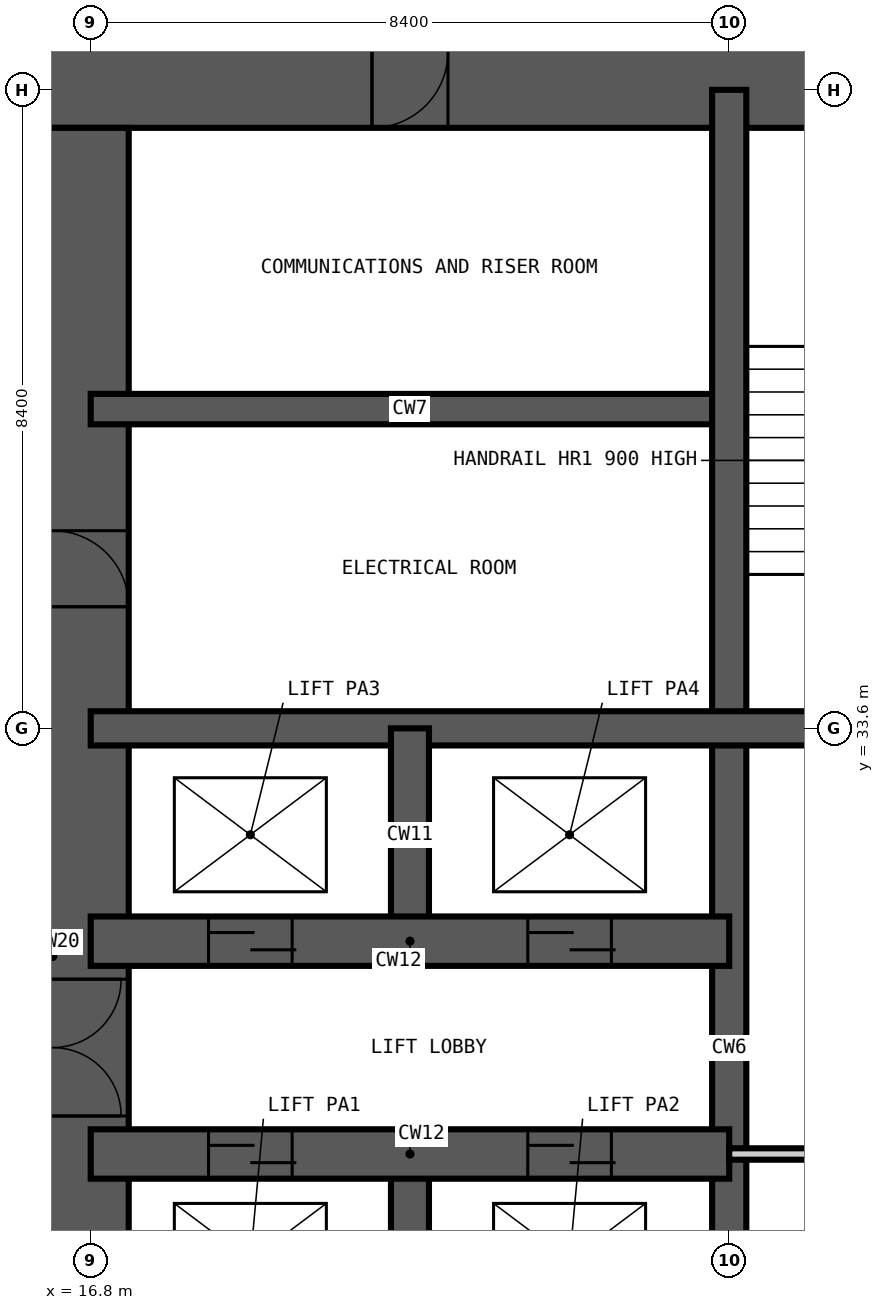
"""IFC4 building model, lengths in metres.
Left out: names, types, materials, properties, quantities, classifications, styles, units other than length and angle.
Written with IfcOpenShell. Run it as: python <this file> out.ifc"""

import sys

from ifc_helpers import new_model, si_unit, direction, frame, frame_2d, origin, place, context, subcontext, project, spatial, rectangle, extrude, element, fill, save


model = new_model("IFC4")
c1 = context("Model", 3, precision=1e-05, world=origin(), true_north=direction((0.0, 1.0)))
c2 = subcontext(c1, "Body", "Model", "MODEL_VIEW")
j1 = project(units=[si_unit("LENGTHUNIT", "METRE"), si_unit("PLANEANGLEUNIT", "RADIAN")], contexts=[c1])
p1 = place(None, origin())
s1 = spatial("IfcSite", under=j1, at=p1, CompositionType="ELEMENT")
p2 = place(p1, origin())
s2 = spatial("IfcBuilding", under=s1, at=p2, CompositionType="ELEMENT")
p3 = place(p2, frame((0.0, 0.0, 27.0)))
s3 = spatial("IfcBuildingStorey", under=s2, at=p3, CompositionType="ELEMENT", Elevation=27.0)
p4 = place(p3, frame((43.5, 42.5, -0.35), z_axis=(0.0, 0.0, 1.0), x_axis=(-1.0, 0.0, 0.0)))
e1 = element("IfcWall", 1, at=p4, inside=s3, PredefinedType="SHEAR", context=c2, shape_type="SweptSolid", body=[
    extrude(rectangle(XDim=28.2, YDim=2.0, at=frame_2d((14.1, 0.0))), origin(), (0.0, 0.0, 1.0), 3.6),
])
p5 = place(p4, frame((22.0, 0.0, 0.35)))
e2 = element("IfcOpeningElement", 2, at=p5, cuts=e1, PredefinedType="OPENING", context=c2, shape_type="SweptSolid", body=[
    extrude(rectangle(XDim=1.0, YDim=2.1, at=frame_2d((0.5, 1.05))), frame((0.0, 1.01, 0.0), z_axis=(0.0, -1.0, 0.0), x_axis=(1.0, 0.0, 0.0)), (0.0, 0.0, 1.0), 2.02),
])
p6 = place(p4, frame((11.4, 0.0, 0.35)))
e3 = element("IfcOpeningElement", 3, at=p6, cuts=e1, PredefinedType="OPENING", context=c2, shape_type="SweptSolid", body=[
    extrude(rectangle(XDim=1.2, YDim=2.2, at=frame_2d((0.6, 1.1))), frame((0.0, 1.01, 0.0), z_axis=(0.0, -1.0, 0.0), x_axis=(1.0, 0.0, 0.0)), (0.0, 0.0, 1.0), 2.02),
])
p7 = place(p3, frame((16.3, 41.5, -0.35), z_axis=(0.0, 0.0, 1.0), x_axis=(0.0, -1.0, 0.0)))
e4 = element("IfcWall", 4, at=p7, inside=s3, PredefinedType="SHEAR", context=c2, shape_type="SweptSolid", body=[
    extrude(rectangle(XDim=24.2, YDim=2.0, at=frame_2d((12.1, 0.0))), origin(), (0.0, 0.0, 1.0), 3.6),
])
p8 = place(p7, frame((11.2, 0.0, 0.35)))
e5 = element("IfcOpeningElement", 5, at=p8, cuts=e4, PredefinedType="OPENING", context=c2, shape_type="SweptSolid", body=[
    extrude(rectangle(XDim=1.8, YDim=2.2, at=frame_2d((0.9, 1.1))), frame((0.0, 1.01, 0.0), z_axis=(0.0, -1.0, 0.0), x_axis=(1.0, 0.0, 0.0)), (0.0, 0.0, 1.0), 2.02),
])
p9 = place(p7, frame((20.0, 0.0, 0.35)))
e6 = element("IfcOpeningElement", 6, at=p9, cuts=e4, PredefinedType="OPENING", context=c2, shape_type="SweptSolid", body=[
    extrude(rectangle(XDim=1.0, YDim=2.1, at=frame_2d((0.5, 1.05))), frame((0.0, 1.01, 0.0), z_axis=(0.0, -1.0, 0.0), x_axis=(1.0, 0.0, 0.0)), (0.0, 0.0, 1.0), 2.02),
])
p10 = place(p7, frame((5.3, 0.0, 0.35)))
e7 = element("IfcOpeningElement", 7, at=p10, cuts=e4, PredefinedType="OPENING", context=c2, shape_type="SweptSolid", body=[
    extrude(rectangle(XDim=1.0, YDim=2.1, at=frame_2d((0.5, 1.05))), frame((0.0, 1.01, 0.0), z_axis=(0.0, -1.0, 0.0), x_axis=(1.0, 0.0, 0.0)), (0.0, 0.0, 1.0), 2.02),
])
p11 = place(p3, frame((16.8, 37.8, -0.35), z_axis=(0.0, 0.0, 1.0), x_axis=(1.0, 0.0, 0.0)))
e8 = element("IfcWall", 8, at=p11, inside=s3, PredefinedType="SHEAR", context=c2, shape_type="SweptSolid", body=[
    extrude(rectangle(XDim=8.4, YDim=0.4, at=frame_2d((4.2, 0.0))), origin(), (0.0, 0.0, 1.0), 3.6),
])
for number, where, z_axis, x_axis in (
    (9, (25.2, 16.8, -0.35), (0.0, 0.0, 1.0), (0.0, 1.0, 0.0)),
    (10, (16.8, 33.6, -0.35), (0.0, 0.0, 1.0), (1.0, 0.0, 0.0)),
):
    element("IfcWall", number, at=place(p3, frame(where, z_axis=z_axis, x_axis=x_axis)), inside=s3, PredefinedType="SHEAR", context=c2, shape_type="SweptSolid", body=[
        extrude(rectangle(XDim=25.2, YDim=0.45, at=frame_2d((12.6, 0.0))), origin(), (0.0, 0.0, 1.0), 3.6),
    ])
for number, where, z_axis, x_axis in (
    (11, (21.0, 25.2, -0.35), (0.0, 0.0, 1.0), (0.0, 1.0, 0.0)),
    (12, (21.0, 30.8, -0.35), (0.0, 0.0, 1.0), (0.0, 1.0, 0.0)),
):
    element("IfcWall", number, at=place(p3, frame(where, z_axis=z_axis, x_axis=x_axis)), inside=s3, PredefinedType="SHEAR", context=c2, shape_type="SweptSolid", body=[
        extrude(rectangle(XDim=2.8, YDim=0.5, at=frame_2d((1.4, 0.0))), origin(), (0.0, 0.0, 1.0), 3.6),
    ])
p12 = place(p3, frame((16.8, 28.0, -0.35), z_axis=(0.0, 0.0, 1.0), x_axis=(1.0, 0.0, 0.0)))
e13 = element("IfcWall", 13, at=p12, inside=s3, PredefinedType="SHEAR", context=c2, shape_type="SweptSolid", body=[
    extrude(rectangle(XDim=8.4, YDim=0.65, at=frame_2d((4.2, 0.0))), origin(), (0.0, 0.0, 1.0), 3.6),
])
p13 = place(p12, frame((1.55, 0.0, 0.35)))
e14 = element("IfcOpeningElement", 14, at=p13, cuts=e13, PredefinedType="OPENING", context=c2, shape_type="SweptSolid", body=[
    extrude(rectangle(XDim=1.1, YDim=2.2, at=frame_2d((0.55, 1.1))), frame((0.0, 0.335, 0.0), z_axis=(0.0, -1.0, 0.0), x_axis=(1.0, 0.0, 0.0)), (0.0, 0.0, 1.0), 0.67),
])
p14 = place(p12, frame((5.75, 0.0, 0.35)))
e15 = element("IfcOpeningElement", 15, at=p14, cuts=e13, PredefinedType="OPENING", context=c2, shape_type="SweptSolid", body=[
    extrude(rectangle(XDim=1.1, YDim=2.2, at=frame_2d((0.55, 1.1))), frame((0.0, 0.335, 0.0), z_axis=(0.0, -1.0, 0.0), x_axis=(1.0, 0.0, 0.0)), (0.0, 0.0, 1.0), 0.67),
])
p15 = place(p3, frame((16.8, 30.8, -0.35), z_axis=(0.0, 0.0, 1.0), x_axis=(1.0, 0.0, 0.0)))
e16 = element("IfcWall", 16, at=p15, inside=s3, PredefinedType="SHEAR", context=c2, shape_type="SweptSolid", body=[
    extrude(rectangle(XDim=8.4, YDim=0.65, at=frame_2d((4.2, 0.0))), origin(), (0.0, 0.0, 1.0), 3.6),
])
p16 = place(p15, frame((1.55, 0.0, 0.35)))
e17 = element("IfcOpeningElement", 17, at=p16, cuts=e16, PredefinedType="OPENING", context=c2, shape_type="SweptSolid", body=[
    extrude(rectangle(XDim=1.1, YDim=2.2, at=frame_2d((0.55, 1.1))), frame((0.0, 0.335, 0.0), z_axis=(0.0, -1.0, 0.0), x_axis=(1.0, 0.0, 0.0)), (0.0, 0.0, 1.0), 0.67),
])
p17 = place(p15, frame((5.75, 0.0, 0.35)))
e18 = element("IfcOpeningElement", 18, at=p17, cuts=e16, PredefinedType="OPENING", context=c2, shape_type="SweptSolid", body=[
    extrude(rectangle(XDim=1.1, YDim=2.2, at=frame_2d((0.55, 1.1))), frame((0.0, 0.335, 0.0), z_axis=(0.0, -1.0, 0.0), x_axis=(1.0, 0.0, 0.0)), (0.0, 0.0, 1.0), 0.67),
])
p18 = place(p3, frame((25.2, 28.0, 0.0), z_axis=(0.0, 0.0, 1.0), x_axis=(1.0, 0.0, 0.0)))
e19 = element("IfcWall", 19, at=p18, inside=s3, PredefinedType="PARTITIONING", context=c2, shape_type="SweptSolid", body=[
    extrude(rectangle(XDim=8.4, YDim=0.15, at=frame_2d((4.2, 0.0))), origin(), (0.0, 0.0, 1.0), 3.25),
])
p19 = place(p18, frame((3.7, 0.0, 0.0)))
e20 = element("IfcOpeningElement", 20, at=p19, cuts=e19, PredefinedType="OPENING", context=c2, shape_type="SweptSolid", body=[
    extrude(rectangle(XDim=1.0, YDim=2.1, at=frame_2d((0.5, 1.05))), frame((0.0, 0.085, 0.0), z_axis=(0.0, -1.0, 0.0), x_axis=(1.0, 0.0, 0.0)), (0.0, 0.0, 1.0), 0.17),
])
p20 = place(p13, origin())
e21 = element("IfcDoor", 21, at=p20, inside=s3, OperationType="DOUBLE_DOOR_SLIDING", PredefinedType="DOOR", context=c2, shape_type="SweptSolid", body=[
    extrude(rectangle(XDim=1.1, YDim=2.2, at=frame_2d((0.55, 1.1))), frame((0.0, 0.025, 0.0), z_axis=(0.0, -1.0, 0.0), x_axis=(1.0, 0.0, 0.0)), (0.0, 0.0, 1.0), 0.05),
])
fill(e14, e21)
p21 = place(p14, origin())
e22 = element("IfcDoor", 22, at=p21, inside=s3, OperationType="DOUBLE_DOOR_SLIDING", PredefinedType="DOOR", context=c2, shape_type="SweptSolid", body=[
    extrude(rectangle(XDim=1.1, YDim=2.2, at=frame_2d((0.55, 1.1))), frame((0.0, 0.025, 0.0), z_axis=(0.0, -1.0, 0.0), x_axis=(1.0, 0.0, 0.0)), (0.0, 0.0, 1.0), 0.05),
])
fill(e15, e22)
p22 = place(p16, origin())
e23 = element("IfcDoor", 23, at=p22, inside=s3, OperationType="DOUBLE_DOOR_SLIDING", PredefinedType="DOOR", context=c2, shape_type="SweptSolid", body=[
    extrude(rectangle(XDim=1.1, YDim=2.2, at=frame_2d((0.55, 1.1))), frame((0.0, 0.025, 0.0), z_axis=(0.0, -1.0, 0.0), x_axis=(1.0, 0.0, 0.0)), (0.0, 0.0, 1.0), 0.05),
])
fill(e17, e23)
p23 = place(p17, origin())
e24 = element("IfcDoor", 24, at=p23, inside=s3, OperationType="DOUBLE_DOOR_SLIDING", PredefinedType="DOOR", context=c2, shape_type="SweptSolid", body=[
    extrude(rectangle(XDim=1.1, YDim=2.2, at=frame_2d((0.55, 1.1))), frame((0.0, 0.025, 0.0), z_axis=(0.0, -1.0, 0.0), x_axis=(1.0, 0.0, 0.0)), (0.0, 0.0, 1.0), 0.05),
])
fill(e18, e24)
p24 = place(p8, origin())
e25 = element("IfcDoor", 25, at=p24, inside=s3, OperationType="DOUBLE_DOOR_DOUBLE_SWING", PredefinedType="DOOR", context=c2, shape_type="SweptSolid", body=[
    extrude(rectangle(XDim=1.8, YDim=2.2, at=frame_2d((0.9, 1.1))), frame((0.0, 0.025, 0.0), z_axis=(0.0, -1.0, 0.0), x_axis=(1.0, 0.0, 0.0)), (0.0, 0.0, 1.0), 0.05),
])
fill(e5, e25)
p25 = place(p10, origin())
e26 = element("IfcDoor", 26, at=p25, inside=s3, OperationType="SINGLE_SWING_RIGHT", PredefinedType="DOOR", context=c2, shape_type="SweptSolid", body=[
    extrude(rectangle(XDim=1.0, YDim=2.1, at=frame_2d((0.5, 1.05))), frame((0.0, 0.025, 0.0), z_axis=(0.0, -1.0, 0.0), x_axis=(1.0, 0.0, 0.0)), (0.0, 0.0, 1.0), 0.05),
])
fill(e7, e26)
p26 = place(p5, origin())
e27 = element("IfcDoor", 27, at=p26, inside=s3, OperationType="SINGLE_SWING_RIGHT", PredefinedType="DOOR", context=c2, shape_type="SweptSolid", body=[
    extrude(rectangle(XDim=1.0, YDim=2.1, at=frame_2d((0.5, 1.05))), frame((0.0, 0.025, 0.0), z_axis=(0.0, -1.0, 0.0), x_axis=(1.0, 0.0, 0.0)), (0.0, 0.0, 1.0), 0.05),
])
fill(e2, e27)
save(model, sys.argv[1])
